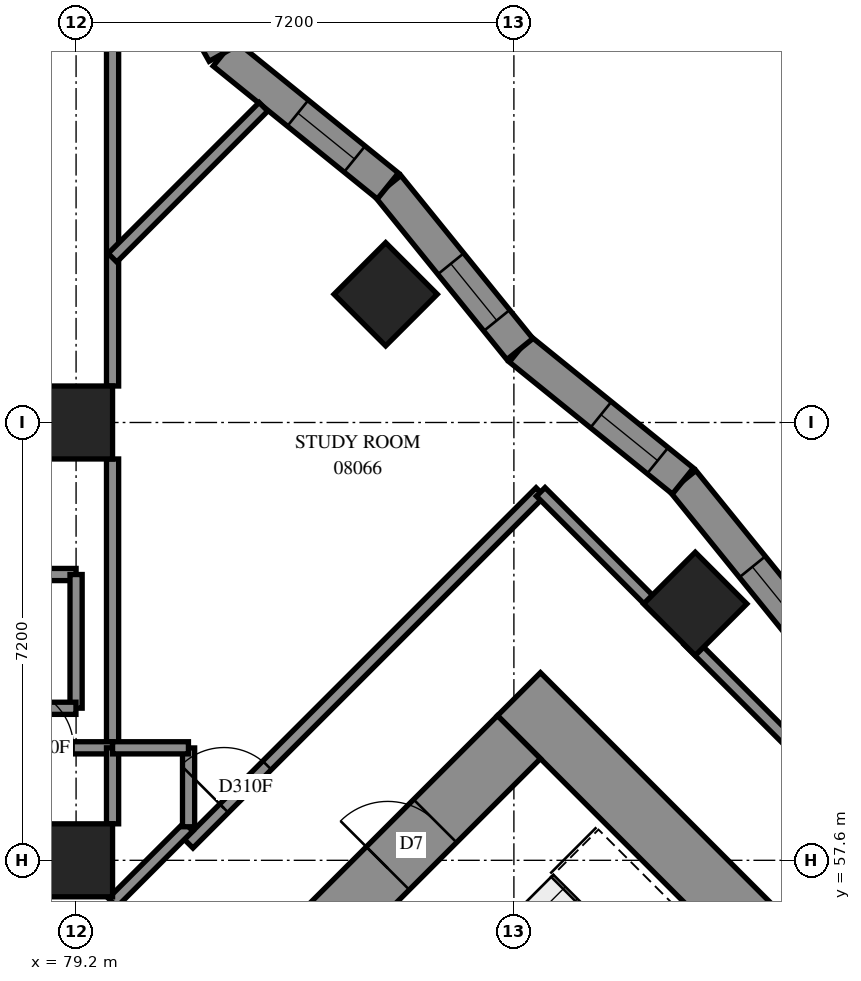
"""IFC4 building model, lengths in metres.
Left out: names, types, materials, properties, quantities, classifications, styles, units other than length and angle.
Written with IfcOpenShell. Run it as: python <this file> out.ifc"""

import sys

from ifc_helpers import new_model, si_unit, direction, frame, frame_2d, origin, origin_2d, place, context, subcontext, project, spatial, polyline, rectangle, outline, extrude, element, fill, save


model = new_model("IFC4")
c1 = context("Model", 3, precision=1e-05, world=origin(), true_north=direction((0.0, 1.0)))
c2 = subcontext(c1, "Body", "Model", "MODEL_VIEW")
j1 = project(units=[si_unit("LENGTHUNIT", "METRE"), si_unit("PLANEANGLEUNIT", "RADIAN")], contexts=[c1])
p1 = place(None, origin())
s1 = spatial("IfcSite", under=j1, at=p1, CompositionType="ELEMENT")
p2 = place(p1, origin())
s2 = spatial("IfcBuilding", under=s1, at=p2, CompositionType="ELEMENT")
p3 = place(p2, frame((0.0, 0.0, 33.8)))
s3 = spatial("IfcBuildingStorey", under=s2, at=p3, CompositionType="ELEMENT", Elevation=33.8)
for number, where, z_axis, x_axis in (
    (1, (79.2, 57.6, 0.0), (0.0, 0.0, 1.0), (1.0, 0.0, 0.0)),
    (2, (79.2, 64.8, 0.0), (0.0, 0.0, 1.0), (1.0, 0.0, 0.0)),
    (3, (84.291, 66.909, 0.0), (0.0, 0.0, 1.0), (0.707, -0.707, 0.0)),
    (4, (89.382, 61.818, 0.0), (0.0, 0.0, 1.0), (0.707, -0.707, 0.0)),
):
    element("IfcColumn", number, at=place(p3, frame(where, z_axis=z_axis, x_axis=x_axis)), inside=s3, PredefinedType="COLUMN", context=c2, shape_type="SweptSolid", body=[
        extrude(rectangle(XDim=1.2, YDim=1.2, at=origin_2d()), origin(), (0.0, 0.0, 1.0), 3.1),
    ])
p4 = place(p3, frame((86.483, 60.333, -0.3), z_axis=(0.0, 0.0, 1.0), x_axis=(0.70710983, -0.7071037324, 0.0)))
e5 = element("IfcWall", 5, at=p4, inside=s3, PredefinedType="SHEAR", context=c2, shape_type="SweptSolid", body=[
    extrude(rectangle(XDim=16.4, YDim=1.0, at=frame_2d((8.2, 0.0))), origin(), (0.0, 0.0, 1.0), 2.7),
])
p5 = place(p4, frame((11.0, 0.0, 0.3)))
e6 = element("IfcOpeningElement", 6, at=p5, cuts=e5, PredefinedType="OPENING", context=c2, shape_type="SweptSolid", body=[
    extrude(rectangle(XDim=0.8, YDim=2.1, at=frame_2d((0.4, 1.05))), frame((0.0, 0.51, 0.0), z_axis=(0.0, -1.0, 0.0), x_axis=(1.0, 0.0, 0.0)), (0.0, 0.0, 1.0), 1.02),
])
p6 = place(p3, frame((76.301, 49.443, -0.3), z_axis=(0.0, 0.0, 1.0), x_axis=(0.7071067812, 0.7071067812, 0.0)))
e7 = element("IfcWall", 7, at=p6, inside=s3, PredefinedType="SHEAR", context=c2, shape_type="SweptSolid", body=[
    extrude(rectangle(XDim=14.4, YDim=1.0, at=frame_2d((7.2, 0.0))), origin(), (0.0, 0.0, 1.0), 2.7),
])
p7 = place(p6, frame((4.55, 0.0, 0.3)))
e8 = element("IfcOpeningElement", 8, at=p7, cuts=e7, PredefinedType="OPENING", context=c2, shape_type="SweptSolid", body=[
    extrude(rectangle(XDim=1.1, YDim=2.1, at=frame_2d((0.55, 1.05))), frame((0.0, 0.51, 0.0), z_axis=(0.0, -1.0, 0.0), x_axis=(1.0, 0.0, 0.0)), (0.0, 0.0, 1.0), 1.02),
])
p8 = place(p6, frame((11.35, 0.0, 0.3)))
e9 = element("IfcOpeningElement", 9, at=p8, cuts=e7, PredefinedType="OPENING", context=c2, shape_type="SweptSolid", body=[
    extrude(rectangle(XDim=1.1, YDim=2.1, at=frame_2d((0.55, 1.05))), frame((0.0, 0.51, 0.0), z_axis=(0.0, -1.0, 0.0), x_axis=(1.0, 0.0, 0.0)), (0.0, 0.0, 1.0), 1.02),
])
p9 = place(p3, frame((91.35, 61.156, 0.0), z_axis=(0.0, 0.0, 1.0), x_axis=(-0.6292374191, 0.7772131435, 0.0)))
e10 = element("IfcWall", 10, at=p9, inside=s3, PredefinedType="SOLIDWALL", context=c2, shape_type="SweptSolid", body=[
    extrude(outline(polyline([(0.029, -0.275), (3.479, -0.275), (3.421, 0.275), (-0.029, 0.275), (0.029, -0.275)])), origin(), (0.0, 0.0, 1.0), 3.1),
])
p10 = place(p9, frame((0.435, 0.0, 0.5)))
e11 = element("IfcOpeningElement", 11, at=p10, cuts=e10, PredefinedType="OPENING", context=c2, shape_type="SweptSolid", body=[
    extrude(rectangle(XDim=1.2, YDim=2.45, at=frame_2d((0.6, 1.225))), frame((0.0, 0.285, 0.0), z_axis=(0.0, -1.0, 0.0), x_axis=(1.0, 0.0, 0.0)), (0.0, 0.0, 1.0), 0.57),
])
p11 = place(p3, frame((89.18, 63.837, 0.0), z_axis=(0.0, 0.0, 1.0), x_axis=(-0.7772131435, 0.6292374191, 0.0)))
e12 = element("IfcWall", 12, at=p11, inside=s3, PredefinedType="SOLIDWALL", context=c2, shape_type="SweptSolid", body=[
    extrude(outline(polyline([(-0.029, -0.275), (3.421, -0.275), (3.479, 0.275), (0.029, 0.275), (-0.029, -0.275)])), origin(), (0.0, 0.0, 1.0), 3.1),
])
p12 = place(p11, frame((0.534, 0.0, 0.5)))
e13 = element("IfcOpeningElement", 13, at=p12, cuts=e12, PredefinedType="OPENING", context=c2, shape_type="SweptSolid", body=[
    extrude(rectangle(XDim=1.2, YDim=2.45, at=frame_2d((0.6, 1.225))), frame((0.0, 0.285, 0.0), z_axis=(0.0, -1.0, 0.0), x_axis=(1.0, 0.0, 0.0)), (0.0, 0.0, 1.0), 0.57),
])
p13 = place(p3, frame((86.498, 66.008, 0.0), z_axis=(0.0, 0.0, 1.0), x_axis=(-0.6292374191, 0.7772131435, 0.0)))
e14 = element("IfcWall", 14, at=p13, inside=s3, PredefinedType="SOLIDWALL", context=c2, shape_type="SweptSolid", body=[
    extrude(outline(polyline([(0.029, -0.275), (3.479, -0.275), (3.421, 0.275), (-0.029, 0.275), (0.029, -0.275)])), origin(), (0.0, 0.0, 1.0), 3.1),
])
p14 = place(p13, frame((0.605, 0.0, 0.5)))
e15 = element("IfcOpeningElement", 15, at=p14, cuts=e14, PredefinedType="OPENING", context=c2, shape_type="SweptSolid", body=[
    extrude(rectangle(XDim=1.2, YDim=2.45, at=frame_2d((0.6, 1.225))), frame((0.0, 0.285, 0.0), z_axis=(0.0, -1.0, 0.0), x_axis=(1.0, 0.0, 0.0)), (0.0, 0.0, 1.0), 0.57),
])
p15 = place(p3, frame((84.327, 68.689, 0.0), z_axis=(0.0, 0.0, 1.0), x_axis=(-0.7772012902, 0.6292520596, 0.0)))
e16 = element("IfcWall", 16, at=p15, inside=s3, PredefinedType="SOLIDWALL", context=c2, shape_type="SweptSolid", body=[
    extrude(outline(polyline([(-0.029, -0.275), (3.421, -0.275), (3.526, 0.275), (0.029, 0.275), (-0.029, -0.275)])), origin(), (0.0, 0.0, 1.0), 3.1),
])
p16 = place(p15, frame((0.704, 0.0, 0.5)))
e17 = element("IfcOpeningElement", 17, at=p16, cuts=e16, PredefinedType="OPENING", context=c2, shape_type="SweptSolid", body=[
    extrude(rectangle(XDim=1.2, YDim=2.45, at=frame_2d((0.6, 1.225))), frame((0.0, 0.285, 0.0), z_axis=(0.0, -1.0, 0.0), x_axis=(1.0, 0.0, 0.0)), (0.0, 0.0, 1.0), 0.57),
])
p17 = place(p3, frame((81.628, 70.875, 0.0), z_axis=(0.0, 0.0, 1.0), x_axis=(-0.4901845493, 0.871618671, 0.0)))
e18 = element("IfcWall", 18, at=p17, inside=s3, PredefinedType="SOLIDWALL", context=c2, shape_type="SweptSolid", body=[
    extrude(outline(polyline([(0.053, -0.275), (3.616, -0.275), (3.195, 0.275), (-0.053, 0.275), (0.053, -0.275)])), origin(), (0.0, 0.0, 1.0), 3.1),
])
p18 = place(p17, frame((0.804, 0.0, 0.5)))
e19 = element("IfcOpeningElement", 19, at=p18, cuts=e18, PredefinedType="OPENING", context=c2, shape_type="SweptSolid", body=[
    extrude(rectangle(XDim=1.2, YDim=2.45, at=frame_2d((0.6, 1.225))), frame((0.0, 0.285, 0.0), z_axis=(0.0, -1.0, 0.0), x_axis=(1.0, 0.0, 0.0)), (0.0, 0.0, 1.0), 0.57),
])
p19 = place(p3, frame((81.052, 57.873, 0.0), z_axis=(0.0, 0.0, 1.0), x_axis=(0.7071067812, 0.7071067812, 0.0)))
e20 = element("IfcWall", 20, at=p19, inside=s3, PredefinedType="PARTITIONING", context=c2, shape_type="SweptSolid", body=[
    extrude(rectangle(XDim=8.18, YDim=0.2, at=frame_2d((4.09, 0.0))), origin(), (0.0, 0.0, 1.0), 3.1),
])
p20 = place(p19, frame((0.823, 0.0, 0.0)))
e21 = element("IfcOpeningElement", 21, at=p20, cuts=e20, PredefinedType="OPENING", context=c2, shape_type="SweptSolid", body=[
    extrude(rectangle(XDim=1.0, YDim=2.1, at=frame_2d((0.5, 1.05))), frame((0.0, 0.11, 0.0), z_axis=(0.0, -1.0, 0.0), x_axis=(1.0, 0.0, 0.0)), (0.0, 0.0, 1.0), 0.22),
])
p21 = place(p3, frame((89.271, 61.215, 0.0), z_axis=(0.0, 0.0, 1.0), x_axis=(0.7071067812, -0.7071067812, 0.0)))
e22 = element("IfcWall", 22, at=p21, inside=s3, PredefinedType="PARTITIONING", context=c2, shape_type="SweptSolid", body=[
    extrude(rectangle(XDim=6.505, YDim=0.2, at=frame_2d((3.253, 0.0))), origin(), (0.0, 0.0, 1.0), 3.1),
])
p22 = place(p3, frame((79.8, 65.4, 0.0), z_axis=(0.0, 0.0, 1.0), x_axis=(0.0, 1.0, 0.0)))
e23 = element("IfcWall", 23, at=p22, inside=s3, PredefinedType="PARTITIONING", context=c2, shape_type="SweptSolid", body=[
    extrude(rectangle(XDim=6.0, YDim=0.2, at=frame_2d((3.0, 0.0))), origin(), (0.0, 0.0, 1.0), 3.1),
])
p23 = place(p3, frame((79.8, 59.45, 0.0), z_axis=(0.0, 0.0, 1.0), x_axis=(0.0, 1.0, 0.0)))
e24 = element("IfcWall", 24, at=p23, inside=s3, PredefinedType="PARTITIONING", context=c2, shape_type="SweptSolid", body=[
    extrude(rectangle(XDim=4.75, YDim=0.2, at=frame_2d((2.375, 0.0))), origin(), (0.0, 0.0, 1.0), 3.1),
])
p24 = place(p3, frame((75.102, 62.3, 0.0), z_axis=(0.0, 0.0, 1.0), x_axis=(1.0, 0.0, 0.0)))
e25 = element("IfcWall", 25, at=p24, inside=s3, PredefinedType="PARTITIONING", context=c2, shape_type="SweptSolid", body=[
    extrude(rectangle(XDim=4.098, YDim=0.2, at=frame_2d((2.049, 0.0))), origin(), (0.0, 0.0, 1.0), 3.1),
])
p25 = place(p3, frame((79.799, 67.509, 0.0), z_axis=(0.0, 0.0, 1.0), x_axis=(0.7070925395, 0.7071210226, 0.0)))
e26 = element("IfcWall", 26, at=p25, inside=s3, PredefinedType="PARTITIONING", context=c2, shape_type="SweptSolid", body=[
    extrude(rectangle(XDim=3.511, YDim=0.2, at=frame_2d((1.755, 0.0))), origin(), (0.0, 0.0, 1.0), 3.1),
])
p26 = place(p3, frame((86.841, 63.659, 0.0), z_axis=(0.0, 0.0, 1.0), x_axis=(0.7067795096, -0.7074339014, 0.0)))
e27 = element("IfcWall", 27, at=p26, inside=s3, PredefinedType="PARTITIONING", context=c2, shape_type="SweptSolid", body=[
    extrude(rectangle(XDim=2.751, YDim=0.2, at=frame_2d((1.375, 0.0))), origin(), (0.0, 0.0, 1.0), 3.1),
])
p27 = place(p3, frame((79.2, 60.102, 0.0), z_axis=(0.0, 0.0, 1.0), x_axis=(0.0, 1.0, 0.0)))
e28 = element("IfcWall", 28, at=p27, inside=s3, PredefinedType="PARTITIONING", context=c2, shape_type="SweptSolid", body=[
    extrude(rectangle(XDim=2.198, YDim=0.2, at=frame_2d((1.099, 0.0))), origin(), (0.0, 0.0, 1.0), 3.1),
])
p28 = place(p3, frame((77.384, 60.1, 0.0), z_axis=(0.0, 0.0, 1.0), x_axis=(1.0, 0.0, 0.0)))
e29 = element("IfcWall", 29, at=p28, inside=s3, PredefinedType="PARTITIONING", context=c2, shape_type="SweptSolid", body=[
    extrude(rectangle(XDim=1.814, YDim=0.2, at=frame_2d((0.907, 0.0))), origin(), (0.0, 0.0, 1.0), 3.1),
])
p29 = place(p3, frame((78.032, 59.45, 0.0), z_axis=(0.0, 0.0, 1.0), x_axis=(1.0, 0.0, 0.0)))
e30 = element("IfcWall", 30, at=p29, inside=s3, PredefinedType="PARTITIONING", context=c2, shape_type="SweptSolid", body=[
    extrude(rectangle(XDim=1.768, YDim=0.2, at=frame_2d((0.884, 0.0))), origin(), (0.0, 0.0, 1.0), 3.1),
])
p30 = place(p29, frame((0.126, 0.0, 0.0)))
e31 = element("IfcOpeningElement", 31, at=p30, cuts=e30, PredefinedType="OPENING", context=c2, shape_type="SweptSolid", body=[
    extrude(rectangle(XDim=1.0, YDim=2.1, at=frame_2d((0.5, 1.05))), frame((0.0, 0.11, 0.0), z_axis=(0.0, -1.0, 0.0), x_axis=(1.0, 0.0, 0.0)), (0.0, 0.0, 1.0), 0.22),
])
p31 = place(p3, frame((79.801, 56.905, 0.0), z_axis=(0.0, 0.0, 1.0), x_axis=(0.7071067812, 0.7071067812, 0.0)))
e32 = element("IfcWall", 32, at=p31, inside=s3, PredefinedType="PARTITIONING", context=c2, shape_type="SweptSolid", body=[
    extrude(rectangle(XDim=1.765, YDim=0.2, at=frame_2d((0.882, 0.0))), origin(), (0.0, 0.0, 1.0), 3.1),
])
p32 = place(p3, frame((81.05, 58.152, 0.0), z_axis=(0.0, 0.0, 1.0), x_axis=(0.0, 1.0, 0.0)))
e33 = element("IfcWall", 33, at=p32, inside=s3, PredefinedType="PARTITIONING", context=c2, shape_type="SweptSolid", body=[
    extrude(rectangle(XDim=1.296, YDim=0.2, at=frame_2d((0.648, 0.0))), origin(), (0.0, 0.0, 1.0), 3.1),
])
p33 = place(p3, frame((79.8, 58.2, 0.0), z_axis=(0.0, 0.0, 1.0), x_axis=(0.0, 1.0, 0.0)))
e34 = element("IfcWall", 34, at=p33, inside=s3, PredefinedType="PARTITIONING", context=c2, shape_type="SweptSolid", body=[
    extrude(rectangle(XDim=1.25, YDim=0.2, at=frame_2d((0.625, 0.0))), origin(), (0.0, 0.0, 1.0), 3.1),
])
p34 = place(p3, frame((79.8, 59.45, 0.0), z_axis=(0.0, 0.0, 1.0), x_axis=(1.0, 0.0, 0.0)))
e35 = element("IfcWall", 35, at=p34, inside=s3, PredefinedType="PARTITIONING", context=c2, shape_type="SweptSolid", body=[
    extrude(rectangle(XDim=1.248, YDim=0.2, at=frame_2d((0.624, 0.0))), origin(), (0.0, 0.0, 1.0), 3.1),
])
p35 = place(p10, origin())
e36 = element("IfcWindow", 36, at=p35, inside=s3, PartitioningType="SINGLE_PANEL", PredefinedType="WINDOW", context=c2, shape_type="SweptSolid", body=[
    extrude(rectangle(XDim=1.2, YDim=2.45, at=frame_2d((0.6, 1.225))), frame((0.0, 0.155, 0.0), z_axis=(0.0, -1.0, 0.0), x_axis=(1.0, 0.0, 0.0)), (0.0, 0.0, 1.0), 0.06),
])
fill(e11, e36)
p36 = place(p12, origin())
e37 = element("IfcWindow", 37, at=p36, inside=s3, PartitioningType="SINGLE_PANEL", PredefinedType="WINDOW", context=c2, shape_type="SweptSolid", body=[
    extrude(rectangle(XDim=1.2, YDim=2.45, at=frame_2d((0.6, 1.225))), frame((0.0, 0.155, 0.0), z_axis=(0.0, -1.0, 0.0), x_axis=(1.0, 0.0, 0.0)), (0.0, 0.0, 1.0), 0.06),
])
fill(e13, e37)
p37 = place(p14, origin())
e38 = element("IfcWindow", 38, at=p37, inside=s3, PartitioningType="SINGLE_PANEL", PredefinedType="WINDOW", context=c2, shape_type="SweptSolid", body=[
    extrude(rectangle(XDim=1.2, YDim=2.45, at=frame_2d((0.6, 1.225))), frame((0.0, 0.155, 0.0), z_axis=(0.0, -1.0, 0.0), x_axis=(1.0, 0.0, 0.0)), (0.0, 0.0, 1.0), 0.06),
])
fill(e15, e38)
p38 = place(p16, origin())
e39 = element("IfcWindow", 39, at=p38, inside=s3, PartitioningType="SINGLE_PANEL", PredefinedType="WINDOW", context=c2, shape_type="SweptSolid", body=[
    extrude(rectangle(XDim=1.2, YDim=2.45, at=frame_2d((0.6, 1.225))), frame((0.0, 0.155, 0.0), z_axis=(0.0, -1.0, 0.0), x_axis=(1.0, 0.0, 0.0)), (0.0, 0.0, 1.0), 0.06),
])
fill(e17, e39)
p39 = place(p8, origin())
e40 = element("IfcDoor", 40, at=p39, inside=s3, OperationType="SINGLE_SWING_LEFT", PredefinedType="DOOR", context=c2, shape_type="SweptSolid", body=[
    extrude(rectangle(XDim=1.1, YDim=2.1, at=frame_2d((0.55, 1.05))), frame((0.0, 0.025, 0.0), z_axis=(0.0, -1.0, 0.0), x_axis=(1.0, 0.0, 0.0)), (0.0, 0.0, 1.0), 0.05),
])
fill(e9, e40)
p40 = place(p30, origin())
e41 = element("IfcDoor", 41, at=p40, inside=s3, OperationType="SINGLE_SWING_LEFT", PredefinedType="DOOR", context=c2, shape_type="SweptSolid", body=[
    extrude(rectangle(XDim=1.0, YDim=2.1, at=frame_2d((0.5, 1.05))), frame((0.0, 0.025, 0.0), z_axis=(0.0, -1.0, 0.0), x_axis=(1.0, 0.0, 0.0)), (0.0, 0.0, 1.0), 0.05),
])
fill(e31, e41)
p41 = place(p20, origin())
e42 = element("IfcDoor", 42, at=p41, inside=s3, OperationType="SINGLE_SWING_RIGHT", PredefinedType="DOOR", context=c2, shape_type="SweptSolid", body=[
    extrude(rectangle(XDim=1.0, YDim=2.1, at=frame_2d((0.5, 1.05))), frame((0.0, 0.025, 0.0), z_axis=(0.0, -1.0, 0.0), x_axis=(1.0, 0.0, 0.0)), (0.0, 0.0, 1.0), 0.05),
])
fill(e21, e42)
save(model, sys.argv[1])
